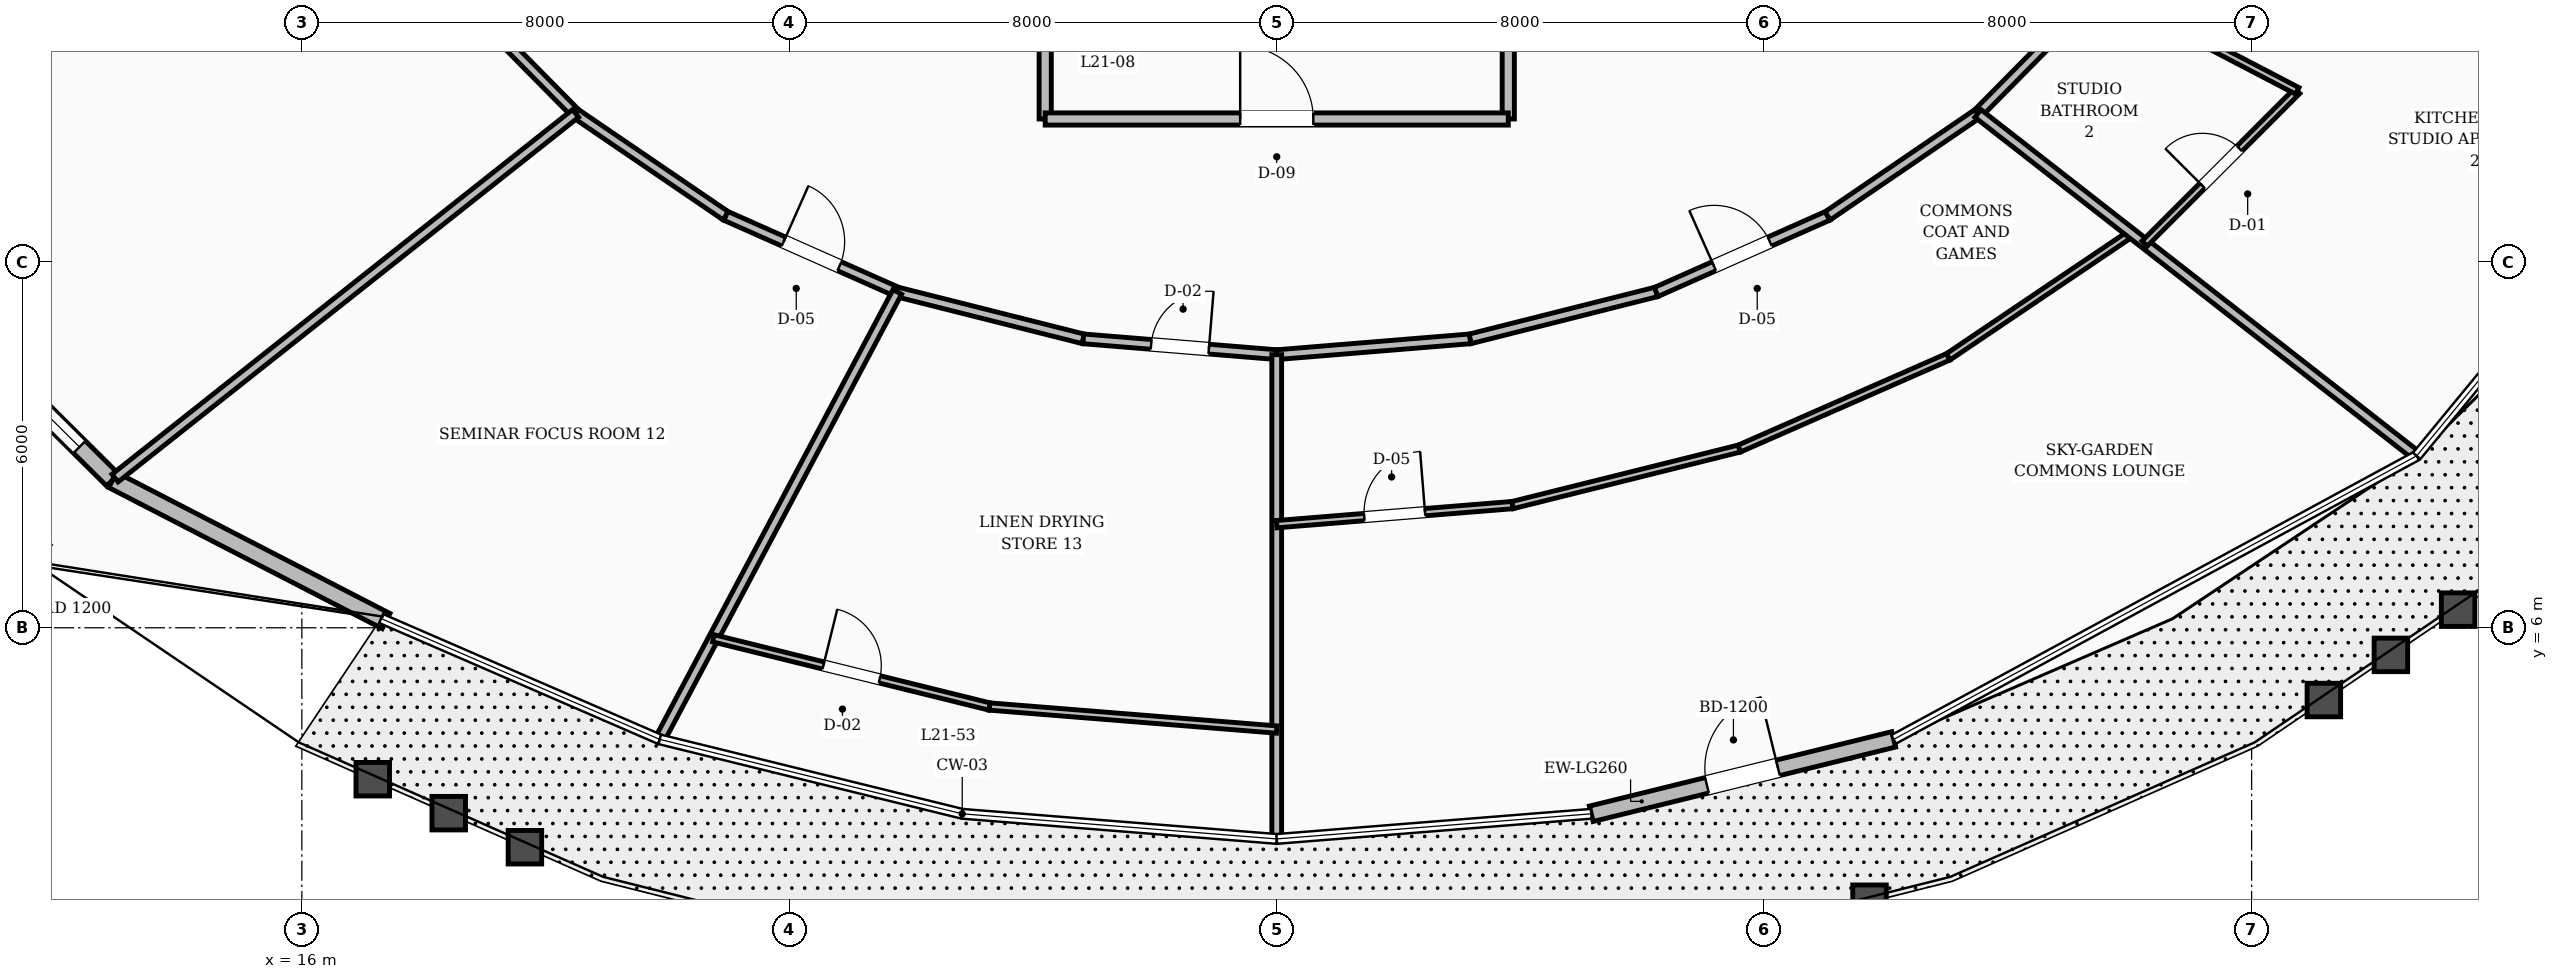
"""IFC4 building model, lengths in metres.
Left out: names, types, materials, properties, quantities, classifications, styles, units other than length and angle.
Written with IfcOpenShell. Run it as: python <this file> out.ifc"""

import sys

from ifc_helpers import new_model, si_unit, direction, frame, frame_2d, origin, place, context, subcontext, project, spatial, rectangle, extrude, element, fill, save


model = new_model("IFC4")
c1 = context("Model", 3, precision=1e-05, world=origin(), true_north=direction((0.0, 1.0)))
c2 = subcontext(c1, "Body", "Model", "MODEL_VIEW")
j1 = project(units=[si_unit("LENGTHUNIT", "METRE"), si_unit("PLANEANGLEUNIT", "RADIAN")], contexts=[c1])
p1 = place(None, origin())
s1 = spatial("IfcSite", under=j1, at=p1, CompositionType="ELEMENT")
p2 = place(p1, origin())
s2 = spatial("IfcBuilding", under=s1, at=p2, CompositionType="ELEMENT")
p3 = place(p2, frame((0.0, 0.0, 84.4)))
s3 = spatial("IfcBuildingStorey", under=s2, at=p3, CompositionType="ELEMENT", Elevation=84.4)
p4 = place(p3, frame((9.534, 11.763, 0.0), z_axis=(0.0, 0.0, 1.0), x_axis=(0.709499676925, -0.704705760189, 0.0)))
e1 = element("IfcWall", 1, at=p4, inside=s3, PredefinedType="STANDARD", context=c2, shape_type="SweptSolid", body=[
    extrude(rectangle(XDim=4.736, YDim=0.28, at=frame_2d((2.368, 0.0))), origin(), (0.0, 0.0, 1.0), 2.71),
])
p5 = place(p4, frame((0.768, 0.0, 0.8)))
e2 = element("IfcOpeningElement", 2, at=p5, cuts=e1, PredefinedType="OPENING", context=c2, shape_type="SweptSolid", body=[
    extrude(rectangle(XDim=3.2, YDim=1.65, at=frame_2d((1.6, 0.825))), frame((0.0, 0.15, 0.0), z_axis=(0.0, -1.0, 0.0), x_axis=(1.0, 0.0, 0.0)), (0.0, 0.0, 1.0), 0.3),
])
p6 = place(p3, frame((12.895, 8.426, 0.0), z_axis=(0.0, 0.0, 1.0), x_axis=(0.888649259328, -0.458587498625, 0.0)))
e3 = element("IfcWall", 3, at=p6, inside=s3, PredefinedType="STANDARD", context=c2, shape_type="SweptSolid", body=[
    extrude(rectangle(XDim=5.05, YDim=0.28, at=frame_2d((2.525, 0.0))), origin(), (0.0, 0.0, 1.0), 2.71),
])
p7 = place(p3, frame((37.162, 2.947, 0.0), z_axis=(0.0, 0.0, 1.0), x_axis=(0.971021017894, 0.238994106219, 0.0)))
e4 = element("IfcWall", 4, at=p7, inside=s3, PredefinedType="STANDARD", context=c2, shape_type="SweptSolid", body=[
    extrude(rectangle(XDim=5.112, YDim=0.26, at=frame_2d((2.556, 0.0))), origin(), (0.0, 0.0, 1.0), 2.71),
])
p8 = place(p7, frame((1.956, 0.0, 0.0)))
e5 = element("IfcOpeningElement", 5, at=p8, cuts=e4, PredefinedType="OPENING", context=c2, shape_type="SweptSolid", body=[
    extrude(rectangle(XDim=1.2, YDim=2.15, at=frame_2d((0.6, 1.075))), frame((0.0, 0.14, 0.0), z_axis=(0.0, -1.0, 0.0), x_axis=(1.0, 0.0, 0.0)), (0.0, 0.0, 1.0), 0.28),
])
for number, where, z_axis, x_axis in (
    (6, (28.2, 14.35, 0.0), (0.0, 0.0, 1.0), (0.0, 1.0, 0.0)),
    (7, (35.8, 14.35, 0.0), (0.0, 0.0, 1.0), (0.0, 1.0, 0.0)),
):
    element("IfcWall", number, at=place(p3, frame(where, z_axis=z_axis, x_axis=x_axis)), inside=s3, PredefinedType="SOLIDWALL", context=c2, shape_type="SweptSolid", body=[
        extrude(rectangle(XDim=2.2, YDim=0.2, at=frame_2d((1.1, 0.0))), origin(), (0.0, 0.0, 1.0), 2.71),
    ])
p9 = place(p3, frame((28.2, 14.35, 0.0), z_axis=(0.0, 0.0, 1.0), x_axis=(1.0, 0.0, 0.0)))
e8 = element("IfcWall", 8, at=p9, inside=s3, PredefinedType="SOLIDWALL", context=c2, shape_type="SweptSolid", body=[
    extrude(rectangle(XDim=7.6, YDim=0.2, at=frame_2d((3.8, 0.0))), origin(), (0.0, 0.0, 1.0), 2.71),
])
p10 = place(p9, frame((3.2, 0.0, 0.0)))
e9 = element("IfcOpeningElement", 9, at=p10, cuts=e8, PredefinedType="OPENING", context=c2, shape_type="SweptSolid", body=[
    extrude(rectangle(XDim=1.2, YDim=2.1, at=frame_2d((0.6, 1.05))), frame((0.0, 0.11, 0.0), z_axis=(0.0, -1.0, 0.0), x_axis=(1.0, 0.0, 0.0)), (0.0, 0.0, 1.0), 0.22),
])
p11 = place(p3, frame((18.469, 16.49, 0.0), z_axis=(0.0, 0.0, 1.0), x_axis=(0.702811997, -0.711375636969, 0.0)))
e10 = element("IfcWall", 10, at=p11, inside=s3, PredefinedType="SOLIDWALL", context=c2, shape_type="SweptSolid", body=[
    extrude(rectangle(XDim=2.879, YDim=0.16, at=frame_2d((1.44, 0.0))), origin(), (0.0, 0.0, 1.0), 2.71),
])
p12 = place(p3, frame((20.492, 14.441, 0.0), z_axis=(0.0, 0.0, 1.0), x_axis=(0.826293096206, -0.56324037423, 0.0)))
e11 = element("IfcWall", 11, at=p12, inside=s3, PredefinedType="SOLIDWALL", context=c2, shape_type="SweptSolid", body=[
    extrude(rectangle(XDim=2.985, YDim=0.16, at=frame_2d((1.492, 0.0))), origin(), (0.0, 0.0, 1.0), 2.71),
])
p13 = place(p3, frame((22.959, 12.76, 0.0), z_axis=(0.0, 0.0, 1.0), x_axis=(0.913952123493, -0.405822024984, 0.0)))
e12 = element("IfcWall", 12, at=p13, inside=s3, PredefinedType="SOLIDWALL", context=c2, shape_type="SweptSolid", body=[
    extrude(rectangle(XDim=3.078, YDim=0.16, at=frame_2d((1.539, 0.0))), origin(), (0.0, 0.0, 1.0), 2.71),
])
p14 = place(p13, frame((1.039, 0.0, 0.0)))
e13 = element("IfcOpeningElement", 13, at=p14, cuts=e12, PredefinedType="OPENING", context=c2, shape_type="SweptSolid", body=[
    extrude(rectangle(XDim=1.0, YDim=2.1, at=frame_2d((0.5, 1.05))), frame((0.0, 0.09, 0.0), z_axis=(0.0, -1.0, 0.0), x_axis=(1.0, 0.0, 0.0)), (0.0, 0.0, 1.0), 0.18),
])
p15 = place(p3, frame((25.772, 11.511, 0.0), z_axis=(0.0, 0.0, 1.0), x_axis=(0.969689238064, -0.244341526521, 0.0)))
e14 = element("IfcWall", 14, at=p15, inside=s3, PredefinedType="SOLIDWALL", context=c2, shape_type="SweptSolid", body=[
    extrude(rectangle(XDim=3.148, YDim=0.16, at=frame_2d((1.574, 0.0))), origin(), (0.0, 0.0, 1.0), 2.71),
])
p16 = place(p3, frame((28.825, 10.742, 0.0), z_axis=(0.0, 0.0, 1.0), x_axis=(0.996669377538, -0.081548463373, 0.0)))
e15 = element("IfcWall", 15, at=p16, inside=s3, PredefinedType="SOLIDWALL", context=c2, shape_type="SweptSolid", body=[
    extrude(rectangle(XDim=3.185, YDim=0.16, at=frame_2d((1.593, 0.0))), origin(), (0.0, 0.0, 1.0), 2.71),
])
p17 = place(p16, frame((1.118, 0.0, 0.0)))
e16 = element("IfcOpeningElement", 16, at=p17, cuts=e15, PredefinedType="OPENING", context=c2, shape_type="SweptSolid", body=[
    extrude(rectangle(XDim=0.95, YDim=2.1, at=frame_2d((0.475, 1.05))), frame((0.0, 0.09, 0.0), z_axis=(0.0, -1.0, 0.0), x_axis=(1.0, 0.0, 0.0)), (0.0, 0.0, 1.0), 0.18),
])
p18 = place(p3, frame((32.0, 10.482, 0.0), z_axis=(0.0, 0.0, 1.0), x_axis=(0.996669377538, 0.081548463373, 0.0)))
e17 = element("IfcWall", 17, at=p18, inside=s3, PredefinedType="SOLIDWALL", context=c2, shape_type="SweptSolid", body=[
    extrude(rectangle(XDim=3.185, YDim=0.16, at=frame_2d((1.593, 0.0))), origin(), (0.0, 0.0, 1.0), 2.71),
])
p19 = place(p3, frame((35.175, 10.742, 0.0), z_axis=(0.0, 0.0, 1.0), x_axis=(0.969689238064, 0.244341526521, 0.0)))
e18 = element("IfcWall", 18, at=p19, inside=s3, PredefinedType="SOLIDWALL", context=c2, shape_type="SweptSolid", body=[
    extrude(rectangle(XDim=3.148, YDim=0.16, at=frame_2d((1.574, 0.0))), origin(), (0.0, 0.0, 1.0), 2.71),
])
p20 = place(p3, frame((38.228, 11.511, 0.0), z_axis=(0.0, 0.0, 1.0), x_axis=(0.913952123493, 0.405822024984, 0.0)))
e19 = element("IfcWall", 19, at=p20, inside=s3, PredefinedType="SOLIDWALL", context=c2, shape_type="SweptSolid", body=[
    extrude(rectangle(XDim=3.078, YDim=0.16, at=frame_2d((1.539, 0.0))), origin(), (0.0, 0.0, 1.0), 2.71),
])
p21 = place(p20, frame((1.039, 0.0, 0.0)))
e20 = element("IfcOpeningElement", 20, at=p21, cuts=e19, PredefinedType="OPENING", context=c2, shape_type="SweptSolid", body=[
    extrude(rectangle(XDim=1.0, YDim=2.1, at=frame_2d((0.5, 1.05))), frame((0.0, 0.09, 0.0), z_axis=(0.0, -1.0, 0.0), x_axis=(1.0, 0.0, 0.0)), (0.0, 0.0, 1.0), 0.18),
])
p22 = place(p3, frame((41.041, 12.76, 0.0), z_axis=(0.0, 0.0, 1.0), x_axis=(0.826293096206, 0.56324037423, 0.0)))
e21 = element("IfcWall", 21, at=p22, inside=s3, PredefinedType="SOLIDWALL", context=c2, shape_type="SweptSolid", body=[
    extrude(rectangle(XDim=2.985, YDim=0.16, at=frame_2d((1.492, 0.0))), origin(), (0.0, 0.0, 1.0), 2.71),
])
p23 = place(p3, frame((43.508, 14.441, 0.0), z_axis=(0.0, 0.0, 1.0), x_axis=(0.702811997, 0.711375636969, 0.0)))
e22 = element("IfcWall", 22, at=p23, inside=s3, PredefinedType="SOLIDWALL", context=c2, shape_type="SweptSolid", body=[
    extrude(rectangle(XDim=2.879, YDim=0.16, at=frame_2d((1.44, 0.0))), origin(), (0.0, 0.0, 1.0), 2.71),
])
p24 = place(p3, frame((32.0, 10.482, 0.0), z_axis=(0.0, 0.0, 1.0), x_axis=(0.0, -1.0, 0.0)))
e23 = element("IfcWall", 23, at=p24, inside=s3, PredefinedType="SOLIDWALL", context=c2, shape_type="SweptSolid", body=[
    extrude(rectangle(XDim=7.897, YDim=0.16, at=frame_2d((3.949, 0.0))), origin(), (0.0, 0.0, 1.0), 2.71),
])
p25 = place(p3, frame((32.0, 7.7, 0.0), z_axis=(0.0, 0.0, 1.0), x_axis=(0.996741082565, 0.080667306436, 0.0)))
e24 = element("IfcWall", 24, at=p25, inside=s3, PredefinedType="PARTITIONING", context=c2, shape_type="SweptSolid", body=[
    extrude(rectangle(XDim=3.883, YDim=0.12, at=frame_2d((1.941, 0.0))), origin(), (0.0, 0.0, 1.0), 2.71),
])
p26 = place(p25, frame((1.442, 0.0, 0.0)))
e25 = element("IfcOpeningElement", 25, at=p26, cuts=e24, PredefinedType="OPENING", context=c2, shape_type="SweptSolid", body=[
    extrude(rectangle(XDim=1.0, YDim=2.1, at=frame_2d((0.5, 1.05))), frame((0.0, 0.07, 0.0), z_axis=(0.0, -1.0, 0.0), x_axis=(1.0, 0.0, 0.0)), (0.0, 0.0, 1.0), 0.14),
])
p27 = place(p3, frame((35.87, 8.014, 0.0), z_axis=(0.0, 0.0, 1.0), x_axis=(0.970321959091, 0.241816657215, 0.0)))
e26 = element("IfcWall", 26, at=p27, inside=s3, PredefinedType="PARTITIONING", context=c2, shape_type="SweptSolid", body=[
    extrude(rectangle(XDim=3.835, YDim=0.12, at=frame_2d((1.918, 0.0))), origin(), (0.0, 0.0, 1.0), 2.71),
])
p28 = place(p3, frame((39.592, 8.941, 0.0), z_axis=(0.0, 0.0, 1.0), x_axis=(0.915581997154, 0.4021313299, 0.0)))
e27 = element("IfcWall", 27, at=p28, inside=s3, PredefinedType="PARTITIONING", context=c2, shape_type="SweptSolid", body=[
    extrude(rectangle(XDim=3.746, YDim=0.12, at=frame_2d((1.873, 0.0))), origin(), (0.0, 0.0, 1.0), 2.71),
])
p29 = place(p3, frame((43.022, 10.448, 0.0), z_axis=(0.0, 0.0, 1.0), x_axis=(0.829159228311, 0.559012499061, 0.0)))
e28 = element("IfcWall", 28, at=p29, inside=s3, PredefinedType="PARTITIONING", context=c2, shape_type="SweptSolid", body=[
    extrude(rectangle(XDim=3.626, YDim=0.12, at=frame_2d((1.813, 0.0))), origin(), (0.0, 0.0, 1.0), 2.71),
])
p30 = place(p3, frame((43.508, 14.441, 0.0), z_axis=(0.0, 0.0, 1.0), x_axis=(0.788383175701, -0.615184499375, 0.0)))
e29 = element("IfcWall", 29, at=p30, inside=s3, PredefinedType="SOLIDWALL", context=c2, shape_type="SweptSolid", body=[
    extrude(rectangle(XDim=9.085, YDim=0.16, at=frame_2d((4.542, 0.0))), origin(), (0.0, 0.0, 1.0), 2.71),
])
p31 = place(p3, frame((46.244, 12.306, 0.0), z_axis=(0.0, 0.0, 1.0), x_axis=(0.707003430705, 0.707210116565, 0.0)))
e30 = element("IfcWall", 30, at=p31, inside=s3, PredefinedType="PARTITIONING", context=c2, shape_type="SweptSolid", body=[
    extrude(rectangle(XDim=3.544, YDim=0.12, at=frame_2d((1.772, 0.0))), origin(), (0.0, 0.0, 1.0), 2.71),
])
p32 = place(p31, frame((1.342, 0.0, 0.0)))
e31 = element("IfcOpeningElement", 31, at=p32, cuts=e30, PredefinedType="OPENING", context=c2, shape_type="SweptSolid", body=[
    extrude(rectangle(XDim=0.86, YDim=2.1, at=frame_2d((0.43, 1.05))), frame((0.0, 0.07, 0.0), z_axis=(0.0, -1.0, 0.0), x_axis=(1.0, 0.0, 0.0)), (0.0, 0.0, 1.0), 0.14),
])
p33 = place(p3, frame((45.531, 16.49, 0.0), z_axis=(0.0, 0.0, 1.0), x_axis=(0.886738326297, -0.462271717366, 0.0)))
e32 = element("IfcWall", 32, at=p33, inside=s3, PredefinedType="PARTITIONING", context=c2, shape_type="SweptSolid", body=[
    extrude(rectangle(XDim=3.629, YDim=0.12, at=frame_2d((1.815, 0.0))), origin(), (0.0, 0.0, 1.0), 2.71),
])
p34 = place(p3, frame((20.492, 14.441, 0.0), z_axis=(0.0, 0.0, 1.0), x_axis=(-0.784008851618, -0.620749644047, 0.0)))
e33 = element("IfcWall", 33, at=p34, inside=s3, PredefinedType="SOLIDWALL", context=c2, shape_type="SweptSolid", body=[
    extrude(rectangle(XDim=9.641, YDim=0.16, at=frame_2d((4.82, 0.0))), origin(), (0.0, 0.0, 1.0), 2.71),
])
p35 = place(p3, frame((25.772, 11.511, 0.0), z_axis=(0.0, 0.0, 1.0), x_axis=(-0.468886600341, -0.883258374441, 0.0)))
e34 = element("IfcWall", 34, at=p35, inside=s3, PredefinedType="SOLIDWALL", context=c2, shape_type="SweptSolid", body=[
    extrude(rectangle(XDim=8.263, YDim=0.16, at=frame_2d((4.131, 0.0))), origin(), (0.0, 0.0, 1.0), 2.71),
])
p36 = place(p3, frame((22.755, 5.827, 0.0), z_axis=(0.0, 0.0, 1.0), x_axis=(0.970824657703, -0.239790500219, 0.0)))
e35 = element("IfcWall", 35, at=p36, inside=s3, PredefinedType="PARTITIONING", context=c2, shape_type="SweptSolid", body=[
    extrude(rectangle(XDim=4.668, YDim=0.12, at=frame_2d((2.334, 0.0))), origin(), (0.0, 0.0, 1.0), 2.71),
])
p37 = place(p36, frame((1.859, 0.0, 0.0)))
e36 = element("IfcOpeningElement", 36, at=p37, cuts=e35, PredefinedType="OPENING", context=c2, shape_type="SweptSolid", body=[
    extrude(rectangle(XDim=0.95, YDim=2.1, at=frame_2d((0.475, 1.05))), frame((0.0, 0.07, 0.0), z_axis=(0.0, -1.0, 0.0), x_axis=(1.0, 0.0, 0.0)), (0.0, 0.0, 1.0), 0.14),
])
p38 = place(p3, frame((27.287, 4.708, 0.0), z_axis=(0.0, 0.0, 1.0), x_axis=(0.996800485308, -0.079929922365, 0.0)))
e37 = element("IfcWall", 37, at=p38, inside=s3, PredefinedType="PARTITIONING", context=c2, shape_type="SweptSolid", body=[
    extrude(rectangle(XDim=4.728, YDim=0.12, at=frame_2d((2.364, 0.0))), origin(), (0.0, 0.0, 1.0), 2.71),
])
p39 = place(p5, origin())
e38 = element("IfcWindow", 38, at=p39, inside=s3, PartitioningType="SINGLE_PANEL", PredefinedType="WINDOW", context=c2, shape_type="SweptSolid", body=[
    extrude(rectangle(XDim=3.2, YDim=1.65, at=frame_2d((1.6, 0.825))), frame((0.0, 0.03, 0.0), z_axis=(0.0, -1.0, 0.0), x_axis=(1.0, 0.0, 0.0)), (0.0, 0.0, 1.0), 0.06),
])
fill(e2, e38)
p40 = place(p8, origin())
e39 = element("IfcDoor", 39, at=p40, inside=s3, OperationType="SINGLE_SWING_RIGHT", PredefinedType="DOOR", context=c2, shape_type="SweptSolid", body=[
    extrude(rectangle(XDim=1.2, YDim=2.15, at=frame_2d((0.6, 1.075))), frame((0.0, 0.025, 0.0), z_axis=(0.0, -1.0, 0.0), x_axis=(1.0, 0.0, 0.0)), (0.0, 0.0, 1.0), 0.05),
])
fill(e5, e39)
p41 = place(p10, origin())
e40 = element("IfcDoor", 40, at=p41, inside=s3, OperationType="SINGLE_SWING_LEFT", PredefinedType="DOOR", context=c2, shape_type="SweptSolid", body=[
    extrude(rectangle(XDim=1.2, YDim=2.1, at=frame_2d((0.6, 1.05))), frame((0.0, 0.025, 0.0), z_axis=(0.0, -1.0, 0.0), x_axis=(1.0, 0.0, 0.0)), (0.0, 0.0, 1.0), 0.05),
])
fill(e9, e40)
p42 = place(p21, origin())
e41 = element("IfcDoor", 41, at=p42, inside=s3, OperationType="SINGLE_SWING_LEFT", PredefinedType="DOOR", context=c2, shape_type="SweptSolid", body=[
    extrude(rectangle(XDim=1.0, YDim=2.1, at=frame_2d((0.5, 1.05))), frame((0.0, 0.025, 0.0), z_axis=(0.0, -1.0, 0.0), x_axis=(1.0, 0.0, 0.0)), (0.0, 0.0, 1.0), 0.05),
])
fill(e20, e41)
p43 = place(p26, origin())
e42 = element("IfcDoor", 42, at=p43, inside=s3, OperationType="SINGLE_SWING_RIGHT", PredefinedType="DOOR", context=c2, shape_type="SweptSolid", body=[
    extrude(rectangle(XDim=1.0, YDim=2.1, at=frame_2d((0.5, 1.05))), frame((0.0, 0.025, 0.0), z_axis=(0.0, -1.0, 0.0), x_axis=(1.0, 0.0, 0.0)), (0.0, 0.0, 1.0), 0.05),
])
fill(e25, e42)
p44 = place(p32, origin())
e43 = element("IfcDoor", 43, at=p44, inside=s3, OperationType="SINGLE_SWING_LEFT", PredefinedType="DOOR", context=c2, shape_type="SweptSolid", body=[
    extrude(rectangle(XDim=0.86, YDim=2.1, at=frame_2d((0.43, 1.05))), frame((0.0, 0.025, 0.0), z_axis=(0.0, -1.0, 0.0), x_axis=(1.0, 0.0, 0.0)), (0.0, 0.0, 1.0), 0.05),
])
fill(e31, e43)
p45 = place(p14, origin())
e44 = element("IfcDoor", 44, at=p45, inside=s3, OperationType="SINGLE_SWING_LEFT", PredefinedType="DOOR", context=c2, shape_type="SweptSolid", body=[
    extrude(rectangle(XDim=1.0, YDim=2.1, at=frame_2d((0.5, 1.05))), frame((0.0, 0.025, 0.0), z_axis=(0.0, -1.0, 0.0), x_axis=(1.0, 0.0, 0.0)), (0.0, 0.0, 1.0), 0.05),
])
fill(e13, e44)
p46 = place(p17, origin())
e45 = element("IfcDoor", 45, at=p46, inside=s3, OperationType="SINGLE_SWING_RIGHT", PredefinedType="DOOR", context=c2, shape_type="SweptSolid", body=[
    extrude(rectangle(XDim=0.95, YDim=2.1, at=frame_2d((0.475, 1.05))), frame((0.0, 0.025, 0.0), z_axis=(0.0, -1.0, 0.0), x_axis=(1.0, 0.0, 0.0)), (0.0, 0.0, 1.0), 0.05),
])
fill(e16, e45)
p47 = place(p37, origin())
e46 = element("IfcDoor", 46, at=p47, inside=s3, OperationType="SINGLE_SWING_LEFT", PredefinedType="DOOR", context=c2, shape_type="SweptSolid", body=[
    extrude(rectangle(XDim=0.95, YDim=2.1, at=frame_2d((0.475, 1.05))), frame((0.0, 0.025, 0.0), z_axis=(0.0, -1.0, 0.0), x_axis=(1.0, 0.0, 0.0)), (0.0, 0.0, 1.0), 0.05),
])
fill(e36, e46)
save(model, sys.argv[1])
